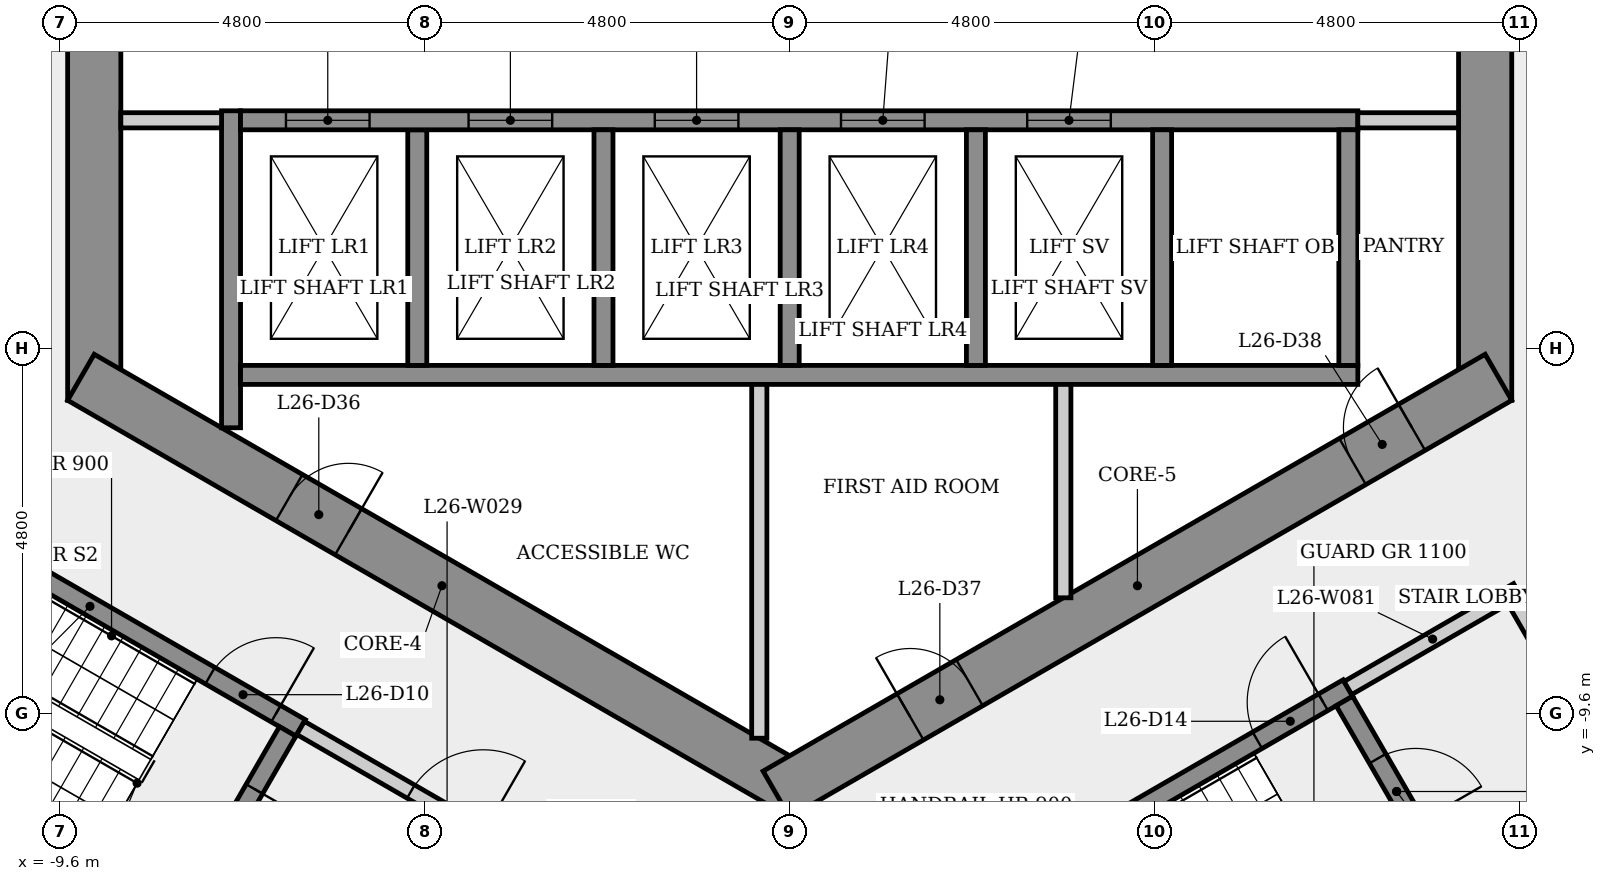
"""IFC4 building model, lengths in metres.
Left out: names, types, materials, properties, quantities, classifications, styles, units other than length and angle.
Written with IfcOpenShell. Run it as: python <this file> out.ifc"""

import sys

from ifc_helpers import new_model, si_unit, direction, frame, frame_2d, origin, place, context, subcontext, project, spatial, rectangle, extrude, element, fill, save


model = new_model("IFC4")
c1 = context("Model", 3, precision=1e-05, world=origin(), true_north=direction((0.0, 1.0)))
c2 = subcontext(c1, "Body", "Model", "MODEL_VIEW")
j1 = project(units=[si_unit("LENGTHUNIT", "METRE"), si_unit("PLANEANGLEUNIT", "RADIAN")], contexts=[c1])
p1 = place(None, origin())
s1 = spatial("IfcSite", under=j1, at=p1, CompositionType="ELEMENT")
p2 = place(p1, origin())
s2 = spatial("IfcBuilding", under=s1, at=p2, CompositionType="ELEMENT")
p3 = place(p2, frame((0.0, 0.0, 100.1)))
s3 = spatial("IfcBuildingStorey", under=s2, at=p3, CompositionType="ELEMENT", Elevation=100.1)
p4 = place(p3, frame((9.15, -5.485, 0.0), z_axis=(0.0, 0.0, 1.0), x_axis=(0.0, 1.0, 0.0)))
e1 = element("IfcWall", 1, at=p4, inside=s3, PredefinedType="SHEAR", context=c2, shape_type="SweptSolid", body=[
    extrude(rectangle(XDim=10.97, YDim=0.7, at=frame_2d((5.485, 0.0))), origin(), (0.0, 0.0, 1.0), 3.4),
])
p5 = place(p4, frame((4.685, 0.0, 0.0)))
e2 = element("IfcOpeningElement", 2, at=p5, cuts=e1, PredefinedType="OPENING", context=c2, shape_type="SweptSolid", body=[
    extrude(rectangle(XDim=1.6, YDim=2.1, at=frame_2d((0.8, 1.05))), frame((0.0, 0.36, 0.0), z_axis=(0.0, -1.0, 0.0), x_axis=(1.0, 0.0, 0.0)), (0.0, 0.0, 1.0), 0.72),
])
p6 = place(p3, frame((-9.15, 5.485, 0.0), z_axis=(0.0, 0.0, 1.0), x_axis=(0.0, -1.0, 0.0)))
e3 = element("IfcWall", 3, at=p6, inside=s3, PredefinedType="SHEAR", context=c2, shape_type="SweptSolid", body=[
    extrude(rectangle(XDim=10.97, YDim=0.7, at=frame_2d((5.485, 0.0))), origin(), (0.0, 0.0, 1.0), 3.4),
])
p7 = place(p6, frame((4.685, 0.0, 0.0)))
e4 = element("IfcOpeningElement", 4, at=p7, cuts=e3, PredefinedType="OPENING", context=c2, shape_type="SweptSolid", body=[
    extrude(rectangle(XDim=1.6, YDim=2.1, at=frame_2d((0.8, 1.05))), frame((0.0, 0.36, 0.0), z_axis=(0.0, -1.0, 0.0), x_axis=(1.0, 0.0, 0.0)), (0.0, 0.0, 1.0), 0.72),
])
p8 = place(p3, frame((-9.325, -5.182, 0.0), z_axis=(0.0, 0.0, 1.0), x_axis=(0.866023993627, -0.500002442456, 0.0)))
e5 = element("IfcWall", 5, at=p8, inside=s3, PredefinedType="SHEAR", context=c2, shape_type="SweptSolid", body=[
    extrude(rectangle(XDim=10.97, YDim=0.7, at=frame_2d((5.485, 0.0))), origin(), (0.0, 0.0, 1.0), 3.4),
])
p9 = place(p8, frame((3.164, 0.0, 0.0)))
e6 = element("IfcOpeningElement", 6, at=p9, cuts=e5, PredefinedType="OPENING", context=c2, shape_type="SweptSolid", body=[
    extrude(rectangle(XDim=0.9, YDim=2.1, at=frame_2d((0.45, 1.05))), frame((0.0, 0.36, 0.0), z_axis=(0.0, -1.0, 0.0), x_axis=(1.0, 0.0, 0.0)), (0.0, 0.0, 1.0), 0.72),
])
p10 = place(p3, frame((-0.175, -10.667, 0.0), z_axis=(0.0, 0.0, 1.0), x_axis=(0.866023993627, 0.500002442456, 0.0)))
e7 = element("IfcWall", 7, at=p10, inside=s3, PredefinedType="SHEAR", context=c2, shape_type="SweptSolid", body=[
    extrude(rectangle(XDim=10.97, YDim=0.7, at=frame_2d((5.485, 0.0))), origin(), (0.0, 0.0, 1.0), 3.4),
])
p11 = place(p10, frame((2.033, 0.0, 0.0)))
e8 = element("IfcOpeningElement", 8, at=p11, cuts=e7, PredefinedType="OPENING", context=c2, shape_type="SweptSolid", body=[
    extrude(rectangle(XDim=0.9, YDim=2.1, at=frame_2d((0.45, 1.05))), frame((0.0, 0.36, 0.0), z_axis=(0.0, -1.0, 0.0), x_axis=(1.0, 0.0, 0.0)), (0.0, 0.0, 1.0), 0.72),
])
p12 = place(p10, frame((8.754, 0.0, 0.0)))
e9 = element("IfcOpeningElement", 9, at=p12, cuts=e7, PredefinedType="OPENING", context=c2, shape_type="SweptSolid", body=[
    extrude(rectangle(XDim=0.9, YDim=2.1, at=frame_2d((0.45, 1.05))), frame((0.0, 0.36, 0.0), z_axis=(0.0, -1.0, 0.0), x_axis=(1.0, 0.0, 0.0)), (0.0, 0.0, 1.0), 0.72),
])
p13 = place(p3, frame((-11.977, -6.595, 0.0), z_axis=(0.0, 0.0, 1.0), x_axis=(0.866025499775, -0.499999833739, 0.0)))
e10 = element("IfcWall", 10, at=p13, inside=s3, PredefinedType="SHEAR", context=c2, shape_type="SweptSolid", body=[
    extrude(rectangle(XDim=6.4, YDim=0.25, at=frame_2d((3.2, 0.0))), origin(), (0.0, 0.0, 1.0), 3.05),
])
p14 = place(p13, frame((5.025, 0.0, 0.0)))
e11 = element("IfcOpeningElement", 11, at=p14, cuts=e10, PredefinedType="OPENING", context=c2, shape_type="SweptSolid", body=[
    extrude(rectangle(XDim=1.0, YDim=2.1, at=frame_2d((0.5, 1.05))), frame((0.0, 0.135, 0.0), z_axis=(0.0, -1.0, 0.0), x_axis=(1.0, 0.0, 0.0)), (0.0, 0.0, 1.0), 0.27),
])
p15 = place(p3, frame((-7.935, -12.393, 0.0), z_axis=(0.0, 0.0, 1.0), x_axis=(-0.866025499775, 0.499999833739, 0.0)))
e12 = element("IfcWall", 12, at=p15, inside=s3, PredefinedType="SHEAR", context=c2, shape_type="SweptSolid", body=[
    extrude(rectangle(XDim=6.4, YDim=0.25, at=frame_2d((3.2, 0.0))), origin(), (0.0, 0.0, 1.0), 3.05),
])
p16 = place(p3, frame((-7.35, -5.846, 0.0), z_axis=(0.0, 0.0, 1.0), x_axis=(0.0, 1.0, 0.0)))
e13 = element("IfcWall", 13, at=p16, inside=s3, PredefinedType="SHEAR", context=c2, shape_type="SweptSolid", body=[
    extrude(rectangle(XDim=4.171, YDim=0.25, at=frame_2d((2.085, 0.0))), origin(), (0.0, 0.0, 1.0), 3.05),
])
p17 = place(p3, frame((-7.475, -1.8, 0.0), z_axis=(0.0, 0.0, 1.0), x_axis=(-1.0, 0.0, 0.0)))
e14 = element("IfcWall", 14, at=p17, inside=s3, PredefinedType="PARTITIONING", context=c2, shape_type="SweptSolid", body=[
    extrude(rectangle(XDim=1.325, YDim=0.2, at=frame_2d((0.663, 0.0))), origin(), (0.0, 0.0, 1.0), 3.05),
])
p18 = place(p3, frame((-6.605, -9.841, 0.0), z_axis=(0.0, 0.0, 1.0), x_axis=(-0.499996545922, -0.866027397988, 0.0)))
e15 = element("IfcWall", 15, at=p18, inside=s3, PredefinedType="SHEAR", context=c2, shape_type="SweptSolid", body=[
    extrude(rectangle(XDim=2.75, YDim=0.25, at=frame_2d((1.375, 0.0))), origin(), (0.0, 0.0, 1.0), 3.05),
])
p19 = place(p18, frame((0.875, 0.0, 0.0)))
e16 = element("IfcOpeningElement", 16, at=p19, cuts=e15, PredefinedType="OPENING", context=c2, shape_type="SweptSolid", body=[
    extrude(rectangle(XDim=1.0, YDim=2.1, at=frame_2d((0.5, 1.05))), frame((0.0, 0.135, 0.0), z_axis=(0.0, -1.0, 0.0), x_axis=(1.0, 0.0, 0.0)), (0.0, 0.0, 1.0), 0.27),
])
p20 = place(p3, frame((-6.435, -9.795, 0.0), z_axis=(0.0, 0.0, 1.0), x_axis=(0.866012907634, -0.500021643343, 0.0)))
e17 = element("IfcWall", 17, at=p20, inside=s3, PredefinedType="PARTITIONING", context=c2, shape_type="SweptSolid", body=[
    extrude(rectangle(XDim=4.45, YDim=0.2, at=frame_2d((2.225, 0.0))), origin(), (0.0, 0.0, 1.0), 3.05),
])
p21 = place(p20, frame((1.675, 0.0, 0.0)))
e18 = element("IfcOpeningElement", 18, at=p21, cuts=e17, PredefinedType="OPENING", context=c2, shape_type="SweptSolid", body=[
    extrude(rectangle(XDim=1.1, YDim=2.1, at=frame_2d((0.55, 1.05))), frame((0.0, 0.11, 0.0), z_axis=(0.0, -1.0, 0.0), x_axis=(1.0, 0.0, 0.0)), (0.0, 0.0, 1.0), 0.22),
])
p22 = place(p3, frame((-7.225, -5.15, 0.0), z_axis=(0.0, 0.0, 1.0), x_axis=(1.0, 0.0, 0.0)))
e19 = element("IfcWall", 19, at=p22, inside=s3, PredefinedType="SHEAR", context=c2, shape_type="SweptSolid", body=[
    extrude(rectangle(XDim=14.7, YDim=0.25, at=frame_2d((7.35, 0.0))), origin(), (0.0, 0.0, 1.0), 3.05),
])
p23 = place(p3, frame((-4.9, -1.925, 0.0), z_axis=(0.0, 0.0, 1.0), x_axis=(0.0, -1.0, 0.0)))
e20 = element("IfcWall", 20, at=p23, inside=s3, PredefinedType="SHEAR", context=c2, shape_type="SweptSolid", body=[
    extrude(rectangle(XDim=3.1, YDim=0.25, at=frame_2d((1.55, 0.0))), origin(), (0.0, 0.0, 1.0), 3.4),
])
p24 = place(p3, frame((-7.225, -1.8, 0.0), z_axis=(0.0, 0.0, 1.0), x_axis=(1.0, 0.0, 0.0)))
e21 = element("IfcWall", 21, at=p24, inside=s3, PredefinedType="SHEAR", context=c2, shape_type="SweptSolid", body=[
    extrude(rectangle(XDim=14.7, YDim=0.25, at=frame_2d((7.35, 0.0))), origin(), (0.0, 0.0, 1.0), 3.05),
])
p25 = place(p24, frame((0.597, 0.0, 0.0)))
e22 = element("IfcOpeningElement", 22, at=p25, cuts=e21, PredefinedType="OPENING", context=c2, shape_type="SweptSolid", body=[
    extrude(rectangle(XDim=1.1, YDim=2.1, at=frame_2d((0.55, 1.05))), frame((0.0, 0.135, 0.0), z_axis=(0.0, -1.0, 0.0), x_axis=(1.0, 0.0, 0.0)), (0.0, 0.0, 1.0), 0.27),
])
p26 = place(p24, frame((3.0, 0.0, 0.0)))
e23 = element("IfcOpeningElement", 23, at=p26, cuts=e21, PredefinedType="OPENING", context=c2, shape_type="SweptSolid", body=[
    extrude(rectangle(XDim=1.1, YDim=2.1, at=frame_2d((0.55, 1.05))), frame((0.0, 0.135, 0.0), z_axis=(0.0, -1.0, 0.0), x_axis=(1.0, 0.0, 0.0)), (0.0, 0.0, 1.0), 0.27),
])
p27 = place(p24, frame((5.45, 0.0, 0.0)))
e24 = element("IfcOpeningElement", 24, at=p27, cuts=e21, PredefinedType="OPENING", context=c2, shape_type="SweptSolid", body=[
    extrude(rectangle(XDim=1.1, YDim=2.1, at=frame_2d((0.55, 1.05))), frame((0.0, 0.135, 0.0), z_axis=(0.0, -1.0, 0.0), x_axis=(1.0, 0.0, 0.0)), (0.0, 0.0, 1.0), 0.27),
])
p28 = place(p24, frame((7.9, 0.0, 0.0)))
e25 = element("IfcOpeningElement", 25, at=p28, cuts=e21, PredefinedType="OPENING", context=c2, shape_type="SweptSolid", body=[
    extrude(rectangle(XDim=1.1, YDim=2.1, at=frame_2d((0.55, 1.05))), frame((0.0, 0.135, 0.0), z_axis=(0.0, -1.0, 0.0), x_axis=(1.0, 0.0, 0.0)), (0.0, 0.0, 1.0), 0.27),
])
p29 = place(p24, frame((10.35, 0.0, 0.0)))
e26 = element("IfcOpeningElement", 26, at=p29, cuts=e21, PredefinedType="OPENING", context=c2, shape_type="SweptSolid", body=[
    extrude(rectangle(XDim=1.1, YDim=2.1, at=frame_2d((0.55, 1.05))), frame((0.0, 0.135, 0.0), z_axis=(0.0, -1.0, 0.0), x_axis=(1.0, 0.0, 0.0)), (0.0, 0.0, 1.0), 0.27),
])
p30 = place(p3, frame((-2.45, -1.925, 0.0), z_axis=(0.0, 0.0, 1.0), x_axis=(0.0, -1.0, 0.0)))
e27 = element("IfcWall", 27, at=p30, inside=s3, PredefinedType="SHEAR", context=c2, shape_type="SweptSolid", body=[
    extrude(rectangle(XDim=3.1, YDim=0.25, at=frame_2d((1.55, 0.0))), origin(), (0.0, 0.0, 1.0), 3.4),
])
p31 = place(p3, frame((-0.4, -5.275, 0.0), z_axis=(0.0, 0.0, 1.0), x_axis=(0.0, -1.0, 0.0)))
e28 = element("IfcWall", 28, at=p31, inside=s3, PredefinedType="PARTITIONING", context=c2, shape_type="SweptSolid", body=[
    extrude(rectangle(XDim=4.656, YDim=0.2, at=frame_2d((2.328, 0.0))), origin(), (0.0, 0.0, 1.0), 3.05),
])
p32 = place(p3, frame((0.0, -1.925, 0.0), z_axis=(0.0, 0.0, 1.0), x_axis=(0.0, -1.0, 0.0)))
e29 = element("IfcWall", 29, at=p32, inside=s3, PredefinedType="SHEAR", context=c2, shape_type="SweptSolid", body=[
    extrude(rectangle(XDim=3.1, YDim=0.25, at=frame_2d((1.55, 0.0))), origin(), (0.0, 0.0, 1.0), 3.4),
])
p33 = place(p3, frame((1.585, -12.595, 0.0), z_axis=(0.0, 0.0, 1.0), x_axis=(0.866036417653, 0.499980922934, 0.0)))
e30 = element("IfcWall", 30, at=p33, inside=s3, PredefinedType="SHEAR", context=c2, shape_type="SweptSolid", body=[
    extrude(rectangle(XDim=6.65, YDim=0.25, at=frame_2d((3.325, 0.0))), origin(), (0.0, 0.0, 1.0), 3.05),
])
p34 = place(p33, frame((5.275, 0.0, 0.0)))
e31 = element("IfcOpeningElement", 31, at=p34, cuts=e30, PredefinedType="OPENING", context=c2, shape_type="SweptSolid", body=[
    extrude(rectangle(XDim=1.0, YDim=2.1, at=frame_2d((0.5, 1.05))), frame((0.0, 0.135, 0.0), z_axis=(0.0, -1.0, 0.0), x_axis=(1.0, 0.0, 0.0)), (0.0, 0.0, 1.0), 0.27),
])
p35 = place(p3, frame((2.45, -1.925, 0.0), z_axis=(0.0, 0.0, 1.0), x_axis=(0.0, -1.0, 0.0)))
e32 = element("IfcWall", 32, at=p35, inside=s3, PredefinedType="SHEAR", context=c2, shape_type="SweptSolid", body=[
    extrude(rectangle(XDim=3.1, YDim=0.25, at=frame_2d((1.55, 0.0))), origin(), (0.0, 0.0, 1.0), 3.4),
])
p36 = place(p3, frame((3.6, -5.275, 0.0), z_axis=(0.0, 0.0, 1.0), x_axis=(0.0, -1.0, 0.0)))
e33 = element("IfcWall", 33, at=p36, inside=s3, PredefinedType="PARTITIONING", context=c2, shape_type="SweptSolid", body=[
    extrude(rectangle(XDim=2.808, YDim=0.2, at=frame_2d((1.404, 0.0))), origin(), (0.0, 0.0, 1.0), 3.05),
])
p37 = place(p3, frame((4.9, -1.925, 0.0), z_axis=(0.0, 0.0, 1.0), x_axis=(0.0, -1.0, 0.0)))
e34 = element("IfcWall", 34, at=p37, inside=s3, PredefinedType="SHEAR", context=c2, shape_type="SweptSolid", body=[
    extrude(rectangle(XDim=3.1, YDim=0.25, at=frame_2d((1.55, 0.0))), origin(), (0.0, 0.0, 1.0), 3.4),
])
p38 = place(p3, frame((7.298, -9.441, 0.0), z_axis=(0.0, 0.0, 1.0), x_axis=(0.500034990121, -0.866005201286, 0.0)))
e35 = element("IfcWall", 35, at=p38, inside=s3, PredefinedType="SHEAR", context=c2, shape_type="SweptSolid", body=[
    extrude(rectangle(XDim=2.75, YDim=0.25, at=frame_2d((1.375, 0.0))), origin(), (0.0, 0.0, 1.0), 3.05),
])
p39 = place(p38, frame((0.875, 0.0, 0.0)))
e36 = element("IfcOpeningElement", 36, at=p39, cuts=e35, PredefinedType="OPENING", context=c2, shape_type="SweptSolid", body=[
    extrude(rectangle(XDim=1.0, YDim=2.1, at=frame_2d((0.5, 1.05))), frame((0.0, 0.135, 0.0), z_axis=(0.0, -1.0, 0.0), x_axis=(1.0, 0.0, 0.0)), (0.0, 0.0, 1.0), 0.27),
])
p40 = place(p3, frame((7.344, -9.27, 0.0), z_axis=(0.0, 0.0, 1.0), x_axis=(0.866005588531, 0.500034319456, 0.0)))
e37 = element("IfcWall", 37, at=p40, inside=s3, PredefinedType="PARTITIONING", context=c2, shape_type="SweptSolid", body=[
    extrude(rectangle(XDim=2.575, YDim=0.2, at=frame_2d((1.288, 0.0))), origin(), (0.0, 0.0, 1.0), 3.05),
])
p41 = place(p3, frame((7.35, -1.925, 0.0), z_axis=(0.0, 0.0, 1.0), x_axis=(0.0, -1.0, 0.0)))
e38 = element("IfcWall", 38, at=p41, inside=s3, PredefinedType="SHEAR", context=c2, shape_type="SweptSolid", body=[
    extrude(rectangle(XDim=3.1, YDim=0.25, at=frame_2d((1.55, 0.0))), origin(), (0.0, 0.0, 1.0), 3.4),
])
p42 = place(p3, frame((8.8, -1.8, 0.0), z_axis=(0.0, 0.0, 1.0), x_axis=(-1.0, 0.0, 0.0)))
e39 = element("IfcWall", 39, at=p42, inside=s3, PredefinedType="PARTITIONING", context=c2, shape_type="SweptSolid", body=[
    extrude(rectangle(XDim=1.325, YDim=0.2, at=frame_2d((0.663, 0.0))), origin(), (0.0, 0.0, 1.0), 3.05),
])
p43 = place(p3, frame((9.537, -8.119, 0.0), z_axis=(0.0, 0.0, 1.0), x_axis=(0.499990139034, -0.866031096941, 0.0)))
e40 = element("IfcWall", 40, at=p43, inside=s3, PredefinedType="PARTITIONING", context=c2, shape_type="SweptSolid", body=[
    extrude(rectangle(XDim=3.0, YDim=0.2, at=frame_2d((1.5, 0.0))), origin(), (0.0, 0.0, 1.0), 3.05),
])
p44 = place(p43, frame((0.935, 0.0, 0.0)))
e41 = element("IfcOpeningElement", 41, at=p44, cuts=e40, PredefinedType="OPENING", context=c2, shape_type="SweptSolid", body=[
    extrude(rectangle(XDim=1.0, YDim=2.1, at=frame_2d((0.5, 1.05))), frame((0.0, 0.11, 0.0), z_axis=(0.0, -1.0, 0.0), x_axis=(1.0, 0.0, 0.0)), (0.0, 0.0, 1.0), 0.22),
])
p45 = place(p3, frame((10.901, -10.681, 0.0), z_axis=(0.0, 0.0, 1.0), x_axis=(-0.866007538022, -0.500030943131, 0.0)))
e42 = element("IfcWall", 42, at=p45, inside=s3, PredefinedType="PARTITIONING", context=c2, shape_type="SweptSolid", body=[
    extrude(rectangle(XDim=2.375, YDim=0.2, at=frame_2d((1.188, 0.0))), origin(), (0.0, 0.0, 1.0), 3.05),
])
p46 = place(p25, origin())
e43 = element("IfcDoor", 43, at=p46, inside=s3, OperationType="SLIDING_TO_LEFT", PredefinedType="DOOR", context=c2, shape_type="SweptSolid", body=[
    extrude(rectangle(XDim=1.1, YDim=2.1, at=frame_2d((0.55, 1.05))), frame((0.0, 0.025, 0.0), z_axis=(0.0, -1.0, 0.0), x_axis=(1.0, 0.0, 0.0)), (0.0, 0.0, 1.0), 0.05),
])
fill(e22, e43)
p47 = place(p26, origin())
e44 = element("IfcDoor", 44, at=p47, inside=s3, OperationType="SLIDING_TO_LEFT", PredefinedType="DOOR", context=c2, shape_type="SweptSolid", body=[
    extrude(rectangle(XDim=1.1, YDim=2.1, at=frame_2d((0.55, 1.05))), frame((0.0, 0.025, 0.0), z_axis=(0.0, -1.0, 0.0), x_axis=(1.0, 0.0, 0.0)), (0.0, 0.0, 1.0), 0.05),
])
fill(e23, e44)
p48 = place(p27, origin())
e45 = element("IfcDoor", 45, at=p48, inside=s3, OperationType="SLIDING_TO_LEFT", PredefinedType="DOOR", context=c2, shape_type="SweptSolid", body=[
    extrude(rectangle(XDim=1.1, YDim=2.1, at=frame_2d((0.55, 1.05))), frame((0.0, 0.025, 0.0), z_axis=(0.0, -1.0, 0.0), x_axis=(1.0, 0.0, 0.0)), (0.0, 0.0, 1.0), 0.05),
])
fill(e24, e45)
p49 = place(p28, origin())
e46 = element("IfcDoor", 46, at=p49, inside=s3, OperationType="SLIDING_TO_LEFT", PredefinedType="DOOR", context=c2, shape_type="SweptSolid", body=[
    extrude(rectangle(XDim=1.1, YDim=2.1, at=frame_2d((0.55, 1.05))), frame((0.0, 0.025, 0.0), z_axis=(0.0, -1.0, 0.0), x_axis=(1.0, 0.0, 0.0)), (0.0, 0.0, 1.0), 0.05),
])
fill(e25, e46)
p50 = place(p29, origin())
e47 = element("IfcDoor", 47, at=p50, inside=s3, OperationType="SLIDING_TO_LEFT", PredefinedType="DOOR", context=c2, shape_type="SweptSolid", body=[
    extrude(rectangle(XDim=1.1, YDim=2.1, at=frame_2d((0.55, 1.05))), frame((0.0, 0.025, 0.0), z_axis=(0.0, -1.0, 0.0), x_axis=(1.0, 0.0, 0.0)), (0.0, 0.0, 1.0), 0.05),
])
fill(e26, e47)
p51 = place(p14, origin())
e48 = element("IfcDoor", 48, at=p51, inside=s3, OperationType="SINGLE_SWING_RIGHT", PredefinedType="DOOR", context=c2, shape_type="SweptSolid", body=[
    extrude(rectangle(XDim=1.0, YDim=2.1, at=frame_2d((0.5, 1.05))), frame((0.0, 0.025, 0.0), z_axis=(0.0, -1.0, 0.0), x_axis=(1.0, 0.0, 0.0)), (0.0, 0.0, 1.0), 0.05),
])
fill(e11, e48)
p52 = place(p19, origin())
e49 = element("IfcDoor", 49, at=p52, inside=s3, OperationType="SINGLE_SWING_LEFT", PredefinedType="DOOR", context=c2, shape_type="SweptSolid", body=[
    extrude(rectangle(XDim=1.0, YDim=2.1, at=frame_2d((0.5, 1.05))), frame((0.0, 0.025, 0.0), z_axis=(0.0, -1.0, 0.0), x_axis=(1.0, 0.0, 0.0)), (0.0, 0.0, 1.0), 0.05),
])
fill(e16, e49)
p53 = place(p21, origin())
e50 = element("IfcDoor", 50, at=p53, inside=s3, OperationType="SINGLE_SWING_RIGHT", PredefinedType="DOOR", context=c2, shape_type="SweptSolid", body=[
    extrude(rectangle(XDim=1.1, YDim=2.1, at=frame_2d((0.55, 1.05))), frame((0.0, 0.025, 0.0), z_axis=(0.0, -1.0, 0.0), x_axis=(1.0, 0.0, 0.0)), (0.0, 0.0, 1.0), 0.05),
])
fill(e18, e50)
p54 = place(p34, origin())
e51 = element("IfcDoor", 51, at=p54, inside=s3, OperationType="SINGLE_SWING_RIGHT", PredefinedType="DOOR", context=c2, shape_type="SweptSolid", body=[
    extrude(rectangle(XDim=1.0, YDim=2.1, at=frame_2d((0.5, 1.05))), frame((0.0, 0.025, 0.0), z_axis=(0.0, -1.0, 0.0), x_axis=(1.0, 0.0, 0.0)), (0.0, 0.0, 1.0), 0.05),
])
fill(e31, e51)
p55 = place(p39, origin())
e52 = element("IfcDoor", 52, at=p55, inside=s3, OperationType="SINGLE_SWING_RIGHT", PredefinedType="DOOR", context=c2, shape_type="SweptSolid", body=[
    extrude(rectangle(XDim=1.0, YDim=2.1, at=frame_2d((0.5, 1.05))), frame((0.0, 0.025, 0.0), z_axis=(0.0, -1.0, 0.0), x_axis=(1.0, 0.0, 0.0)), (0.0, 0.0, 1.0), 0.05),
])
fill(e36, e52)
p56 = place(p9, origin())
e53 = element("IfcDoor", 53, at=p56, inside=s3, OperationType="SINGLE_SWING_RIGHT", PredefinedType="DOOR", context=c2, shape_type="SweptSolid", body=[
    extrude(rectangle(XDim=0.9, YDim=2.1, at=frame_2d((0.45, 1.05))), frame((0.0, 0.025, 0.0), z_axis=(0.0, -1.0, 0.0), x_axis=(1.0, 0.0, 0.0)), (0.0, 0.0, 1.0), 0.05),
])
fill(e6, e53)
p57 = place(p11, origin())
e54 = element("IfcDoor", 54, at=p57, inside=s3, OperationType="SINGLE_SWING_LEFT", PredefinedType="DOOR", context=c2, shape_type="SweptSolid", body=[
    extrude(rectangle(XDim=0.9, YDim=2.1, at=frame_2d((0.45, 1.05))), frame((0.0, 0.025, 0.0), z_axis=(0.0, -1.0, 0.0), x_axis=(1.0, 0.0, 0.0)), (0.0, 0.0, 1.0), 0.05),
])
fill(e8, e54)
p58 = place(p12, origin())
e55 = element("IfcDoor", 55, at=p58, inside=s3, OperationType="SINGLE_SWING_RIGHT", PredefinedType="DOOR", context=c2, shape_type="SweptSolid", body=[
    extrude(rectangle(XDim=0.9, YDim=2.1, at=frame_2d((0.45, 1.05))), frame((0.0, 0.025, 0.0), z_axis=(0.0, -1.0, 0.0), x_axis=(1.0, 0.0, 0.0)), (0.0, 0.0, 1.0), 0.05),
])
fill(e9, e55)
save(model, sys.argv[1])
